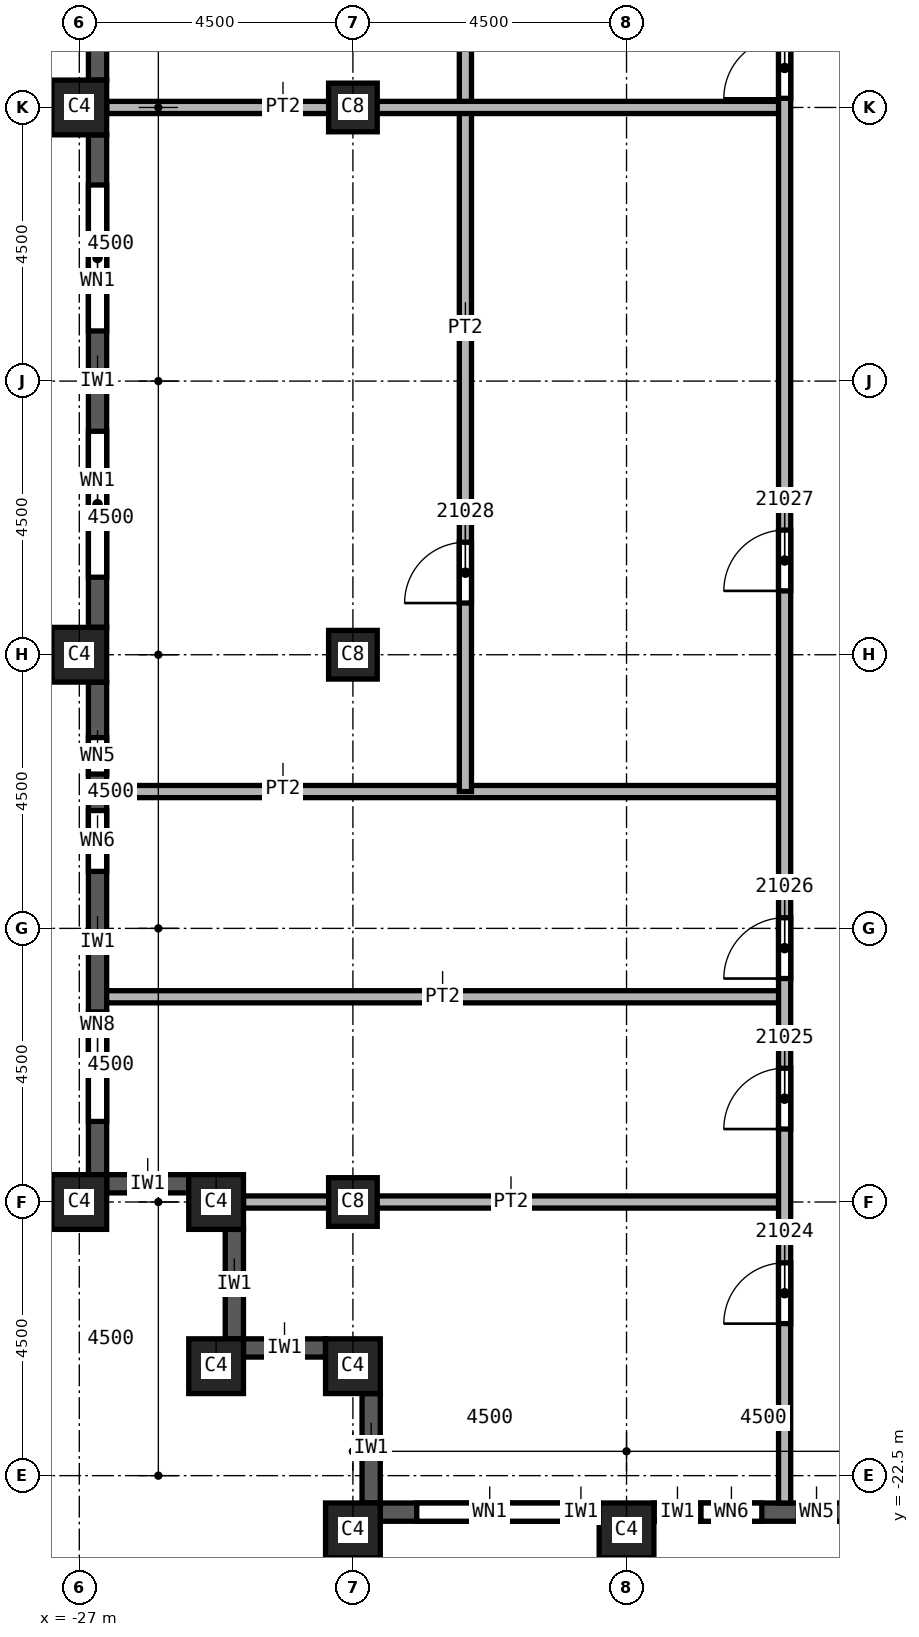
"""IFC4 building model, lengths in metres.
Left out: names, types, materials, properties, quantities, classifications, styles, units other than length and angle.
Written with IfcOpenShell. Run it as: python <this file> out.ifc"""

import sys

from ifc_helpers import new_model, si_unit, direction, frame, frame_2d, origin, origin_2d, place, context, subcontext, project, spatial, rectangle, extrude, element, fill, save


model = new_model("IFC4")
c1 = context("Model", 3, precision=1e-05, world=origin(), true_north=direction((0.0, 1.0)))
c2 = subcontext(c1, "Body", "Model", "MODEL_VIEW")
j1 = project(units=[si_unit("LENGTHUNIT", "METRE"), si_unit("PLANEANGLEUNIT", "RADIAN")], contexts=[c1])
p1 = place(None, origin())
s1 = spatial("IfcSite", under=j1, at=p1, CompositionType="ELEMENT")
p2 = place(p1, origin())
s2 = spatial("IfcBuilding", under=s1, at=p2, CompositionType="ELEMENT")
p3 = place(p2, frame((0.0, 0.0, 304.0)))
s3 = spatial("IfcBuildingStorey", under=s2, at=p3, CompositionType="ELEMENT", Elevation=304.0)
for number, where, z_axis, x_axis in (
    (1, (-22.5, 0.0, 0.0), (0.0, 0.0, 1.0), (1.0, 0.0, 0.0)),
    (2, (-22.5, -9.0, 0.0), (0.0, 0.0, 1.0), (1.0, 0.0, 0.0)),
    (3, (-22.5, -18.0, 0.0), (0.0, 0.0, 1.0), (1.0, 0.0, 0.0)),
):
    element("IfcColumn", number, at=place(p3, frame(where, z_axis=z_axis, x_axis=x_axis)), inside=s3, PredefinedType="COLUMN", context=c2, shape_type="SweptSolid", body=[
        extrude(rectangle(XDim=0.8, YDim=0.8, at=origin_2d()), origin(), (0.0, 0.0, 1.0), 3.74),
    ])
for number, where, z_axis, x_axis in (
    (4, (-18.0, -23.4, 0.0), (0.0, 0.0, 1.0), (1.0, 0.0, 0.0)),
    (5, (-22.5, -23.4, 0.0), (0.0, 0.0, 1.0), (1.0, 0.0, 0.0)),
    (6, (-27.0, 0.0, 0.0), (0.0, 0.0, 1.0), (0.0, 1.0, 0.0)),
    (7, (-27.0, -9.0, 0.0), (0.0, 0.0, 1.0), (0.0, 1.0, 0.0)),
    (8, (-27.0, -18.0, 0.0), (0.0, 0.0, 1.0), (0.0, 1.0, 0.0)),
    (9, (-22.5, -20.7, 0.0), (0.0, 0.0, 1.0), (1.0, 0.0, 0.0)),
    (10, (-24.75, -20.7, 0.0), (0.0, 0.0, 1.0), (1.0, 0.0, 0.0)),
    (11, (-24.75, -18.0, 0.0), (0.0, 0.0, 1.0), (1.0, 0.0, 0.0)),
):
    element("IfcColumn", number, at=place(p3, frame(where, z_axis=z_axis, x_axis=x_axis)), inside=s3, PredefinedType="COLUMN", context=c2, shape_type="SweptSolid", body=[
        extrude(rectangle(XDim=0.9, YDim=0.9, at=origin_2d()), origin(), (0.0, 0.0, 1.0), 3.74),
    ])
p4 = place(p3, frame((-26.7, 8.55, 0.0), z_axis=(0.0, 0.0, 1.0), x_axis=(0.0, -1.0, 0.0)))
e12 = element("IfcWall", 12, at=p4, inside=s3, PredefinedType="SOLIDWALL", context=c2, shape_type="SweptSolid", body=[
    extrude(rectangle(XDim=8.1, YDim=0.3, at=frame_2d((4.05, 0.0))), origin(), (0.0, 0.0, 1.0), 3.14),
])
p5 = place(p4, frame((4.875, 0.0, 0.8)))
e13 = element("IfcOpeningElement", 13, at=p5, cuts=e12, PredefinedType="OPENING", context=c2, shape_type="SweptSolid", body=[
    extrude(rectangle(XDim=2.4, YDim=1.95, at=frame_2d((1.2, 0.975))), frame((0.0, 0.15, 0.0), z_axis=(0.0, -1.0, 0.0), x_axis=(1.0, 0.0, 0.0)), (0.0, 0.0, 1.0), 0.3),
])
p6 = place(p4, frame((0.913, 0.0, 0.8)))
e14 = element("IfcOpeningElement", 14, at=p6, cuts=e12, PredefinedType="OPENING", context=c2, shape_type="SweptSolid", body=[
    extrude(rectangle(XDim=0.6, YDim=1.95, at=frame_2d((0.3, 0.975))), frame((0.0, 0.15, 0.0), z_axis=(0.0, -1.0, 0.0), x_axis=(1.0, 0.0, 0.0)), (0.0, 0.0, 1.0), 0.3),
])
p7 = place(p4, frame((2.113, 0.0, 0.8)))
e15 = element("IfcOpeningElement", 15, at=p7, cuts=e12, PredefinedType="OPENING", context=c2, shape_type="SweptSolid", body=[
    extrude(rectangle(XDim=1.0, YDim=1.95, at=frame_2d((0.5, 0.975))), frame((0.0, 0.15, 0.0), z_axis=(0.0, -1.0, 0.0), x_axis=(1.0, 0.0, 0.0)), (0.0, 0.0, 1.0), 0.3),
])
p8 = place(p3, frame((-26.7, -0.45, 0.0), z_axis=(0.0, 0.0, 1.0), x_axis=(0.0, -1.0, 0.0)))
e16 = element("IfcWall", 16, at=p8, inside=s3, PredefinedType="SOLIDWALL", context=c2, shape_type="SweptSolid", body=[
    extrude(rectangle(XDim=8.1, YDim=0.3, at=frame_2d((4.05, 0.0))), origin(), (0.0, 0.0, 1.0), 3.14),
])
p9 = place(p8, frame((0.825, 0.0, 0.8)))
e17 = element("IfcOpeningElement", 17, at=p9, cuts=e16, PredefinedType="OPENING", context=c2, shape_type="SweptSolid", body=[
    extrude(rectangle(XDim=2.4, YDim=1.95, at=frame_2d((1.2, 0.975))), frame((0.0, 0.15, 0.0), z_axis=(0.0, -1.0, 0.0), x_axis=(1.0, 0.0, 0.0)), (0.0, 0.0, 1.0), 0.3),
])
p10 = place(p8, frame((4.875, 0.0, 0.8)))
e18 = element("IfcOpeningElement", 18, at=p10, cuts=e16, PredefinedType="OPENING", context=c2, shape_type="SweptSolid", body=[
    extrude(rectangle(XDim=2.4, YDim=1.95, at=frame_2d((1.2, 0.975))), frame((0.0, 0.15, 0.0), z_axis=(0.0, -1.0, 0.0), x_axis=(1.0, 0.0, 0.0)), (0.0, 0.0, 1.0), 0.3),
])
p11 = place(p3, frame((-26.7, -9.45, 0.0), z_axis=(0.0, 0.0, 1.0), x_axis=(0.0, -1.0, 0.0)))
e19 = element("IfcWall", 19, at=p11, inside=s3, PredefinedType="SOLIDWALL", context=c2, shape_type="SweptSolid", body=[
    extrude(rectangle(XDim=8.1, YDim=0.3, at=frame_2d((4.05, 0.0))), origin(), (0.0, 0.0, 1.0), 3.14),
])
p12 = place(p11, frame((0.913, 0.0, 0.8)))
e20 = element("IfcOpeningElement", 20, at=p12, cuts=e19, PredefinedType="OPENING", context=c2, shape_type="SweptSolid", body=[
    extrude(rectangle(XDim=0.6, YDim=1.95, at=frame_2d((0.3, 0.975))), frame((0.0, 0.15, 0.0), z_axis=(0.0, -1.0, 0.0), x_axis=(1.0, 0.0, 0.0)), (0.0, 0.0, 1.0), 0.3),
])
p13 = place(p11, frame((2.113, 0.0, 0.8)))
e21 = element("IfcOpeningElement", 21, at=p13, cuts=e19, PredefinedType="OPENING", context=c2, shape_type="SweptSolid", body=[
    extrude(rectangle(XDim=1.0, YDim=1.95, at=frame_2d((0.5, 0.975))), frame((0.0, 0.15, 0.0), z_axis=(0.0, -1.0, 0.0), x_axis=(1.0, 0.0, 0.0)), (0.0, 0.0, 1.0), 0.3),
])
p14 = place(p11, frame((5.425, 0.0, 0.8)))
e22 = element("IfcOpeningElement", 22, at=p14, cuts=e19, PredefinedType="OPENING", context=c2, shape_type="SweptSolid", body=[
    extrude(rectangle(XDim=1.8, YDim=1.95, at=frame_2d((0.9, 0.975))), frame((0.0, 0.15, 0.0), z_axis=(0.0, -1.0, 0.0), x_axis=(1.0, 0.0, 0.0)), (0.0, 0.0, 1.0), 0.3),
])
p15 = place(p3, frame((-26.55, -17.7, 0.0), z_axis=(0.0, 0.0, 1.0), x_axis=(1.0, 0.0, 0.0)))
e23 = element("IfcWall", 23, at=p15, inside=s3, PredefinedType="SOLIDWALL", context=c2, shape_type="SweptSolid", body=[
    extrude(rectangle(XDim=1.35, YDim=0.3, at=frame_2d((0.675, 0.0))), origin(), (0.0, 0.0, 1.0), 3.14),
])
p16 = place(p3, frame((-24.45, -18.45, 0.0), z_axis=(0.0, 0.0, 1.0), x_axis=(0.0, -1.0, 0.0)))
e24 = element("IfcWall", 24, at=p16, inside=s3, PredefinedType="SOLIDWALL", context=c2, shape_type="SweptSolid", body=[
    extrude(rectangle(XDim=1.8, YDim=0.3, at=frame_2d((0.9, 0.0))), origin(), (0.0, 0.0, 1.0), 3.14),
])
p17 = place(p3, frame((-24.3, -20.4, 0.0), z_axis=(0.0, 0.0, 1.0), x_axis=(1.0, 0.0, 0.0)))
e25 = element("IfcWall", 25, at=p17, inside=s3, PredefinedType="SOLIDWALL", context=c2, shape_type="SweptSolid", body=[
    extrude(rectangle(XDim=1.35, YDim=0.3, at=frame_2d((0.675, 0.0))), origin(), (0.0, 0.0, 1.0), 3.14),
])
p18 = place(p3, frame((-22.2, -21.15, 0.0), z_axis=(0.0, 0.0, 1.0), x_axis=(0.0, -1.0, 0.0)))
e26 = element("IfcWall", 26, at=p18, inside=s3, PredefinedType="SOLIDWALL", context=c2, shape_type="SweptSolid", body=[
    extrude(rectangle(XDim=1.8, YDim=0.3, at=frame_2d((0.9, 0.0))), origin(), (0.0, 0.0, 1.0), 3.14),
])
p19 = place(p3, frame((-22.05, -23.1, 0.0), z_axis=(0.0, 0.0, 1.0), x_axis=(1.0, 0.0, 0.0)))
e27 = element("IfcWall", 27, at=p19, inside=s3, PredefinedType="SOLIDWALL", context=c2, shape_type="SweptSolid", body=[
    extrude(rectangle(XDim=3.6, YDim=0.3, at=frame_2d((1.8, 0.0))), origin(), (0.0, 0.0, 1.0), 3.14),
])
p20 = place(p19, frame((0.6, 0.0, 0.8)))
e28 = element("IfcOpeningElement", 28, at=p20, cuts=e27, PredefinedType="OPENING", context=c2, shape_type="SweptSolid", body=[
    extrude(rectangle(XDim=2.4, YDim=1.95, at=frame_2d((1.2, 0.975))), frame((0.0, 0.15, 0.0), z_axis=(0.0, -1.0, 0.0), x_axis=(1.0, 0.0, 0.0)), (0.0, 0.0, 1.0), 0.3),
])
p21 = place(p3, frame((-17.55, -23.1, 0.0), z_axis=(0.0, 0.0, 1.0), x_axis=(1.0, 0.0, 0.0)))
e29 = element("IfcWall", 29, at=p21, inside=s3, PredefinedType="SOLIDWALL", context=c2, shape_type="SweptSolid", body=[
    extrude(rectangle(XDim=3.6, YDim=0.3, at=frame_2d((1.8, 0.0))), origin(), (0.0, 0.0, 1.0), 3.14),
])
p22 = place(p21, frame((0.775, 0.0, 0.8)))
e30 = element("IfcOpeningElement", 30, at=p22, cuts=e29, PredefinedType="OPENING", context=c2, shape_type="SweptSolid", body=[
    extrude(rectangle(XDim=1.0, YDim=1.95, at=frame_2d((0.5, 0.975))), frame((0.0, 0.15, 0.0), z_axis=(0.0, -1.0, 0.0), x_axis=(1.0, 0.0, 0.0)), (0.0, 0.0, 1.0), 0.3),
])
p23 = place(p21, frame((2.375, 0.0, 0.8)))
e31 = element("IfcOpeningElement", 31, at=p23, cuts=e29, PredefinedType="OPENING", context=c2, shape_type="SweptSolid", body=[
    extrude(rectangle(XDim=0.6, YDim=1.95, at=frame_2d((0.3, 0.975))), frame((0.0, 0.15, 0.0), z_axis=(0.0, -1.0, 0.0), x_axis=(1.0, 0.0, 0.0)), (0.0, 0.0, 1.0), 0.3),
])
for number, where, z_axis, x_axis in (
    (32, (-26.55, -14.625, 0.0), (0.0, 0.0, 1.0), (1.0, 0.0, 0.0)),
    (33, (-26.55, -11.25, 0.0), (0.0, 0.0, 1.0), (1.0, 0.0, 0.0)),
):
    element("IfcWall", number, at=place(p3, frame(where, z_axis=z_axis, x_axis=x_axis)), inside=s3, PredefinedType="PARTITIONING", context=c2, shape_type="SweptSolid", body=[
        extrude(rectangle(XDim=11.15, YDim=0.2, at=frame_2d((5.575, 0.0))), origin(), (0.0, 0.0, 1.0), 3.74),
    ])
p24 = place(p3, frame((-24.3, -18.0, 0.0), z_axis=(0.0, 0.0, 1.0), x_axis=(1.0, 0.0, 0.0)))
e34 = element("IfcWall", 34, at=p24, inside=s3, PredefinedType="PARTITIONING", context=c2, shape_type="SweptSolid", body=[
    extrude(rectangle(XDim=8.9, YDim=0.2, at=frame_2d((4.45, 0.0))), origin(), (0.0, 0.0, 1.0), 3.74),
])
p25 = place(p3, frame((-20.65, -11.25, 0.0), z_axis=(0.0, 0.0, 1.0), x_axis=(0.0, 1.0, 0.0)))
e35 = element("IfcWall", 35, at=p25, inside=s3, PredefinedType="PARTITIONING", context=c2, shape_type="SweptSolid", body=[
    extrude(rectangle(XDim=18.1, YDim=0.2, at=frame_2d((9.05, 0.0))), origin(), (0.0, 0.0, 1.0), 3.74),
])
p26 = place(p25, frame((16.8, 0.0, 0.0)))
e36 = element("IfcOpeningElement", 36, at=p26, cuts=e35, PredefinedType="OPENING", context=c2, shape_type="SweptSolid", body=[
    extrude(rectangle(XDim=1.0, YDim=2.1, at=frame_2d((0.5, 1.05))), frame((0.0, 0.1, 0.0), z_axis=(0.0, -1.0, 0.0), x_axis=(1.0, 0.0, 0.0)), (0.0, 0.0, 1.0), 0.2),
])
p27 = place(p25, frame((3.1, 0.0, 0.0)))
e37 = element("IfcOpeningElement", 37, at=p27, cuts=e35, PredefinedType="OPENING", context=c2, shape_type="SweptSolid", body=[
    extrude(rectangle(XDim=1.0, YDim=2.1, at=frame_2d((0.5, 1.05))), frame((0.0, 0.1, 0.0), z_axis=(0.0, -1.0, 0.0), x_axis=(1.0, 0.0, 0.0)), (0.0, 0.0, 1.0), 0.2),
])
p28 = place(p3, frame((-15.4, 0.0, 0.0), z_axis=(0.0, 0.0, 1.0), x_axis=(-1.0, 0.0, 0.0)))
e38 = element("IfcWall", 38, at=p28, inside=s3, PredefinedType="PARTITIONING", context=c2, shape_type="SweptSolid", body=[
    extrude(rectangle(XDim=11.15, YDim=0.2, at=frame_2d((5.575, 0.0))), origin(), (0.0, 0.0, 1.0), 3.74),
])
p29 = place(p3, frame((-15.4, -22.95, 0.0), z_axis=(0.0, 0.0, 1.0), x_axis=(0.0, 1.0, 0.0)))
e39 = element("IfcWall", 39, at=p29, inside=s3, PredefinedType="PARTITIONING", context=c2, shape_type="SweptSolid", body=[
    extrude(rectangle(XDim=36.55, YDim=0.2, at=frame_2d((18.275, 0.0))), origin(), (0.0, 0.0, 1.0), 3.74),
])
p30 = place(p29, frame((23.1, 0.0, 0.0)))
e40 = element("IfcOpeningElement", 40, at=p30, cuts=e39, PredefinedType="OPENING", context=c2, shape_type="SweptSolid", body=[
    extrude(rectangle(XDim=1.0, YDim=2.1, at=frame_2d((0.5, 1.05))), frame((0.0, 0.1, 0.0), z_axis=(0.0, -1.0, 0.0), x_axis=(1.0, 0.0, 0.0)), (0.0, 0.0, 1.0), 0.2),
])
p31 = place(p29, frame((34.35, 0.0, 0.0)))
e41 = element("IfcOpeningElement", 41, at=p31, cuts=e39, PredefinedType="OPENING", context=c2, shape_type="SweptSolid", body=[
    extrude(rectangle(XDim=1.0, YDim=2.1, at=frame_2d((0.5, 1.05))), frame((0.0, 0.1, 0.0), z_axis=(0.0, -1.0, 0.0), x_axis=(1.0, 0.0, 0.0)), (0.0, 0.0, 1.0), 0.2),
])
p32 = place(p29, frame((2.95, 0.0, 0.0)))
e42 = element("IfcOpeningElement", 42, at=p32, cuts=e39, PredefinedType="OPENING", context=c2, shape_type="SweptSolid", body=[
    extrude(rectangle(XDim=1.0, YDim=2.1, at=frame_2d((0.5, 1.05))), frame((0.0, 0.1, 0.0), z_axis=(0.0, -1.0, 0.0), x_axis=(1.0, 0.0, 0.0)), (0.0, 0.0, 1.0), 0.2),
])
p33 = place(p29, frame((6.15, 0.0, 0.0)))
e43 = element("IfcOpeningElement", 43, at=p33, cuts=e39, PredefinedType="OPENING", context=c2, shape_type="SweptSolid", body=[
    extrude(rectangle(XDim=1.0, YDim=2.1, at=frame_2d((0.5, 1.05))), frame((0.0, 0.1, 0.0), z_axis=(0.0, -1.0, 0.0), x_axis=(1.0, 0.0, 0.0)), (0.0, 0.0, 1.0), 0.2),
])
p34 = place(p29, frame((8.625, 0.0, 0.0)))
e44 = element("IfcOpeningElement", 44, at=p34, cuts=e39, PredefinedType="OPENING", context=c2, shape_type="SweptSolid", body=[
    extrude(rectangle(XDim=1.0, YDim=2.1, at=frame_2d((0.5, 1.05))), frame((0.0, 0.1, 0.0), z_axis=(0.0, -1.0, 0.0), x_axis=(1.0, 0.0, 0.0)), (0.0, 0.0, 1.0), 0.2),
])
p35 = place(p29, frame((15.0, 0.0, 0.0)))
e45 = element("IfcOpeningElement", 45, at=p35, cuts=e39, PredefinedType="OPENING", context=c2, shape_type="SweptSolid", body=[
    extrude(rectangle(XDim=1.0, YDim=2.1, at=frame_2d((0.5, 1.05))), frame((0.0, 0.1, 0.0), z_axis=(0.0, -1.0, 0.0), x_axis=(1.0, 0.0, 0.0)), (0.0, 0.0, 1.0), 0.2),
])
p36 = place(p9, origin())
e46 = element("IfcWindow", 46, at=p36, inside=s3, PartitioningType="SINGLE_PANEL", PredefinedType="WINDOW", context=c2, shape_type="SweptSolid", body=[
    extrude(rectangle(XDim=2.4, YDim=1.95, at=frame_2d((1.2, 0.975))), frame((0.0, 0.03, 0.0), z_axis=(0.0, -1.0, 0.0), x_axis=(1.0, 0.0, 0.0)), (0.0, 0.0, 1.0), 0.06),
])
fill(e17, e46)
p37 = place(p10, origin())
e47 = element("IfcWindow", 47, at=p37, inside=s3, PartitioningType="SINGLE_PANEL", PredefinedType="WINDOW", context=c2, shape_type="SweptSolid", body=[
    extrude(rectangle(XDim=2.4, YDim=1.95, at=frame_2d((1.2, 0.975))), frame((0.0, 0.03, 0.0), z_axis=(0.0, -1.0, 0.0), x_axis=(1.0, 0.0, 0.0)), (0.0, 0.0, 1.0), 0.06),
])
fill(e18, e47)
p38 = place(p20, origin())
e48 = element("IfcWindow", 48, at=p38, inside=s3, PartitioningType="SINGLE_PANEL", PredefinedType="WINDOW", context=c2, shape_type="SweptSolid", body=[
    extrude(rectangle(XDim=2.4, YDim=1.95, at=frame_2d((1.2, 0.975))), frame((0.0, 0.03, 0.0), z_axis=(0.0, -1.0, 0.0), x_axis=(1.0, 0.0, 0.0)), (0.0, 0.0, 1.0), 0.06),
])
fill(e28, e48)
p39 = place(p30, origin())
e49 = element("IfcDoor", 49, at=p39, inside=s3, OperationType="SINGLE_SWING_RIGHT", PredefinedType="DOOR", context=c2, shape_type="SweptSolid", body=[
    extrude(rectangle(XDim=1.0, YDim=2.1, at=frame_2d((0.5, 1.05))), frame((0.0, 0.025, 0.0), z_axis=(0.0, -1.0, 0.0), x_axis=(1.0, 0.0, 0.0)), (0.0, 0.0, 1.0), 0.05),
])
fill(e40, e49)
p40 = place(p32, origin())
e50 = element("IfcDoor", 50, at=p40, inside=s3, OperationType="SINGLE_SWING_LEFT", PredefinedType="DOOR", context=c2, shape_type="SweptSolid", body=[
    extrude(rectangle(XDim=1.0, YDim=2.1, at=frame_2d((0.5, 1.05))), frame((0.0, 0.025, 0.0), z_axis=(0.0, -1.0, 0.0), x_axis=(1.0, 0.0, 0.0)), (0.0, 0.0, 1.0), 0.05),
])
fill(e42, e50)
p41 = place(p33, origin())
e51 = element("IfcDoor", 51, at=p41, inside=s3, OperationType="SINGLE_SWING_RIGHT", PredefinedType="DOOR", context=c2, shape_type="SweptSolid", body=[
    extrude(rectangle(XDim=1.0, YDim=2.1, at=frame_2d((0.5, 1.05))), frame((0.0, 0.025, 0.0), z_axis=(0.0, -1.0, 0.0), x_axis=(1.0, 0.0, 0.0)), (0.0, 0.0, 1.0), 0.05),
])
fill(e43, e51)
p42 = place(p34, origin())
e52 = element("IfcDoor", 52, at=p42, inside=s3, OperationType="SINGLE_SWING_LEFT", PredefinedType="DOOR", context=c2, shape_type="SweptSolid", body=[
    extrude(rectangle(XDim=1.0, YDim=2.1, at=frame_2d((0.5, 1.05))), frame((0.0, 0.025, 0.0), z_axis=(0.0, -1.0, 0.0), x_axis=(1.0, 0.0, 0.0)), (0.0, 0.0, 1.0), 0.05),
])
fill(e44, e52)
p43 = place(p35, origin())
e53 = element("IfcDoor", 53, at=p43, inside=s3, OperationType="SINGLE_SWING_RIGHT", PredefinedType="DOOR", context=c2, shape_type="SweptSolid", body=[
    extrude(rectangle(XDim=1.0, YDim=2.1, at=frame_2d((0.5, 1.05))), frame((0.0, 0.025, 0.0), z_axis=(0.0, -1.0, 0.0), x_axis=(1.0, 0.0, 0.0)), (0.0, 0.0, 1.0), 0.05),
])
fill(e45, e53)
p44 = place(p27, origin())
e54 = element("IfcDoor", 54, at=p44, inside=s3, OperationType="SINGLE_SWING_LEFT", PredefinedType="DOOR", context=c2, shape_type="SweptSolid", body=[
    extrude(rectangle(XDim=1.0, YDim=2.1, at=frame_2d((0.5, 1.05))), frame((0.0, 0.025, 0.0), z_axis=(0.0, -1.0, 0.0), x_axis=(1.0, 0.0, 0.0)), (0.0, 0.0, 1.0), 0.05),
])
fill(e37, e54)
p45 = place(p12, origin())
e55 = element("IfcWindow", 55, at=p45, inside=s3, PartitioningType="SINGLE_PANEL", PredefinedType="WINDOW", context=c2, shape_type="SweptSolid", body=[
    extrude(rectangle(XDim=0.6, YDim=1.95, at=frame_2d((0.3, 0.975))), frame((0.0, 0.03, 0.0), z_axis=(0.0, -1.0, 0.0), x_axis=(1.0, 0.0, 0.0)), (0.0, 0.0, 1.0), 0.06),
])
fill(e20, e55)
p46 = place(p13, origin())
e56 = element("IfcWindow", 56, at=p46, inside=s3, PartitioningType="SINGLE_PANEL", PredefinedType="WINDOW", context=c2, shape_type="SweptSolid", body=[
    extrude(rectangle(XDim=1.0, YDim=1.95, at=frame_2d((0.5, 0.975))), frame((0.0, 0.03, 0.0), z_axis=(0.0, -1.0, 0.0), x_axis=(1.0, 0.0, 0.0)), (0.0, 0.0, 1.0), 0.06),
])
fill(e21, e56)
p47 = place(p14, origin())
e57 = element("IfcWindow", 57, at=p47, inside=s3, PartitioningType="SINGLE_PANEL", PredefinedType="WINDOW", context=c2, shape_type="SweptSolid", body=[
    extrude(rectangle(XDim=1.8, YDim=1.95, at=frame_2d((0.9, 0.975))), frame((0.0, 0.03, 0.0), z_axis=(0.0, -1.0, 0.0), x_axis=(1.0, 0.0, 0.0)), (0.0, 0.0, 1.0), 0.06),
])
fill(e22, e57)
p48 = place(p22, origin())
e58 = element("IfcWindow", 58, at=p48, inside=s3, PartitioningType="SINGLE_PANEL", PredefinedType="WINDOW", context=c2, shape_type="SweptSolid", body=[
    extrude(rectangle(XDim=1.0, YDim=1.95, at=frame_2d((0.5, 0.975))), frame((0.0, 0.03, 0.0), z_axis=(0.0, -1.0, 0.0), x_axis=(1.0, 0.0, 0.0)), (0.0, 0.0, 1.0), 0.06),
])
fill(e30, e58)
p49 = place(p23, origin())
e59 = element("IfcWindow", 59, at=p49, inside=s3, PartitioningType="SINGLE_PANEL", PredefinedType="WINDOW", context=c2, shape_type="SweptSolid", body=[
    extrude(rectangle(XDim=0.6, YDim=1.95, at=frame_2d((0.3, 0.975))), frame((0.0, 0.03, 0.0), z_axis=(0.0, -1.0, 0.0), x_axis=(1.0, 0.0, 0.0)), (0.0, 0.0, 1.0), 0.06),
])
fill(e31, e59)
save(model, sys.argv[1])
